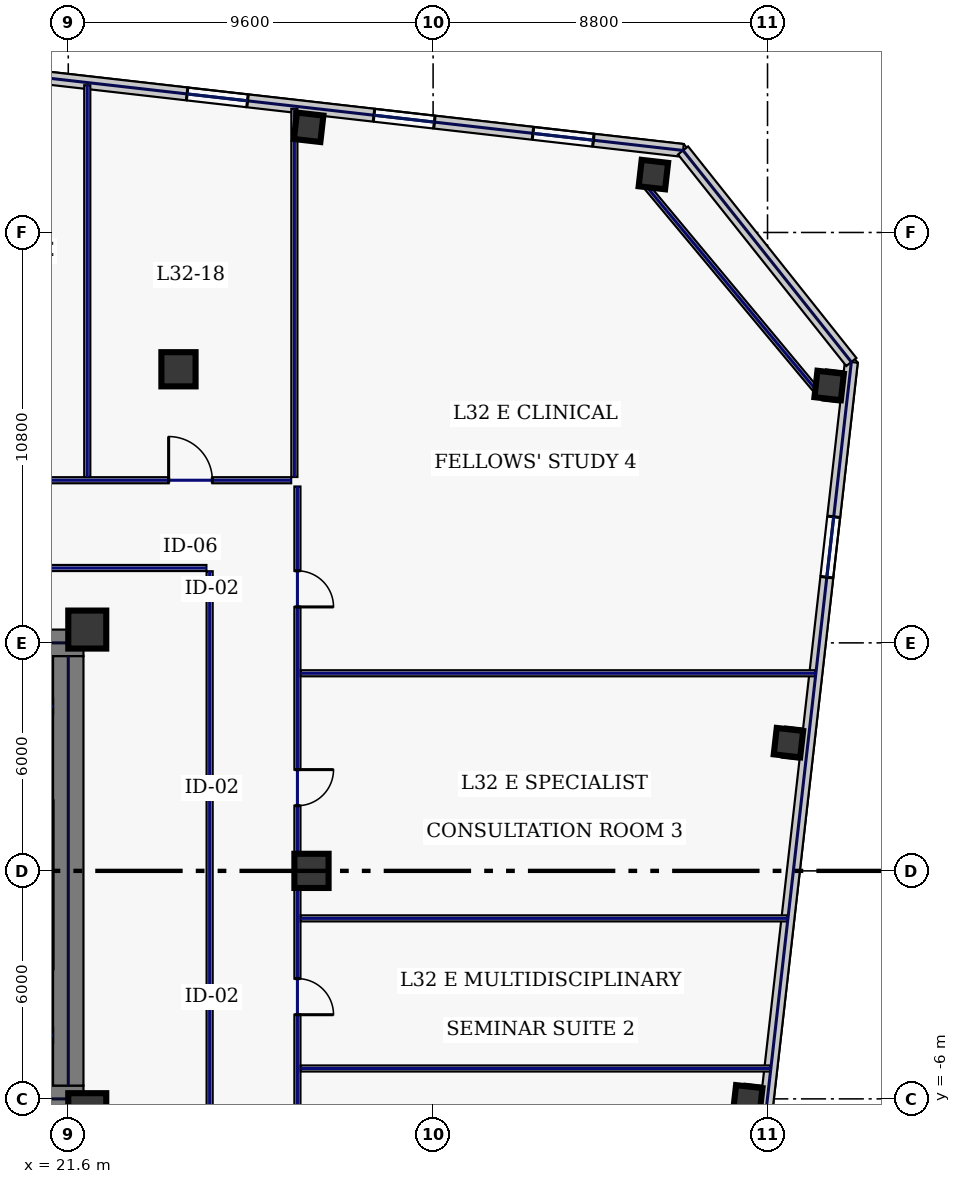
"""IFC4 building model, lengths in metres.
Left out: names, types, materials, properties, quantities, classifications, styles, units other than length and angle.
Written with IfcOpenShell. Run it as: python <this file> out.ifc"""

import sys

from ifc_helpers import new_model, si_unit, direction, frame, frame_2d, origin, origin_2d, place, context, subcontext, project, spatial, rectangle, hollow_rectangle, extrude, element, fill, save


model = new_model("IFC4")
c1 = context("Model", 3, precision=1e-05, world=origin(), true_north=direction((0.0, 1.0)))
c2 = subcontext(c1, "Body", "Model", "MODEL_VIEW")
j1 = project(units=[si_unit("LENGTHUNIT", "METRE"), si_unit("PLANEANGLEUNIT", "RADIAN")], contexts=[c1])
p1 = place(None, origin())
s1 = spatial("IfcSite", under=j1, at=p1, CompositionType="ELEMENT")
p2 = place(p1, origin())
s2 = spatial("IfcBuilding", under=s1, at=p2, CompositionType="ELEMENT")
p3 = place(p2, frame((0.0, 0.0, 141.4)))
s3 = spatial("IfcBuildingStorey", under=s2, at=p3, CompositionType="ELEMENT", Elevation=141.4)
for number, where, z_axis, x_axis in (
    (1, (10.45, 6.0, 0.0), (0.0, 0.0, 1.0), (1.0, 0.0, 0.0)),
    (2, (10.45, -6.0, 0.0), (0.0, 0.0, 1.0), (1.0, 0.0, 0.0)),
):
    element("IfcWall", number, at=place(p3, frame(where, z_axis=z_axis, x_axis=x_axis)), inside=s3, PredefinedType="SHEAR", context=c2, shape_type="SweptSolid", body=[
        extrude(rectangle(XDim=11.55, YDim=0.7, at=frame_2d((5.775, 0.0))), origin(), (0.0, 0.0, 1.0), 4.48),
    ])
p4 = place(p3, frame((21.6, -5.65, 0.0), z_axis=(0.0, 0.0, 1.0), x_axis=(0.0, 1.0, 0.0)))
e3 = element("IfcWall", 3, at=p4, inside=s3, PredefinedType="SHEAR", context=c2, shape_type="SweptSolid", body=[
    extrude(rectangle(XDim=11.3, YDim=0.8, at=frame_2d((5.65, 0.0))), origin(), (0.0, 0.0, 1.0), 4.48),
])
for number, where, z_axis, x_axis in (
    (4, (17.8, -4.325, 0.0), (0.0, 0.0, 1.0), (1.0, 0.0, 0.0)),
    (5, (17.8, 4.325, 0.0), (0.0, 0.0, 1.0), (1.0, 0.0, 0.0)),
):
    element("IfcWall", number, at=place(p3, frame(where, z_axis=z_axis, x_axis=x_axis)), inside=s3, PredefinedType="SHEAR", context=c2, shape_type="SweptSolid", body=[
        extrude(rectangle(XDim=3.4, YDim=0.4, at=frame_2d((1.7, 0.0))), origin(), (0.0, 0.0, 1.0), 4.48),
    ])
for number, where, z_axis, x_axis in (
    (6, (22.1, -6.35, 0.0), (0.0, 0.0, 1.0), (1.0, 0.0, 0.0)),
    (7, (22.1, 6.35, 0.0), (0.0, 0.0, 1.0), (1.0, 0.0, 0.0)),
):
    element("IfcColumn", number, at=place(p3, frame(where, z_axis=z_axis, x_axis=x_axis)), inside=s3, PredefinedType="COLUMN", context=c2, shape_type="SweptSolid", body=[
        extrude(hollow_rectangle(XDim=1.0, YDim=1.0, WallThickness=0.045, at=origin_2d()), origin(), (0.0, 0.0, 1.0), 4.48),
    ])
for number, where, z_axis, x_axis in (
    (8, (24.5, 13.2, 0.0), (0.0, 0.0, 1.0), (1.0, 0.0, 0.0)),
    (9, (28.0, 0.0, 0.0), (0.0, 0.0, 1.0), (1.0, 0.0, 0.0)),
):
    element("IfcColumn", number, at=place(p3, frame(where, z_axis=z_axis, x_axis=x_axis)), inside=s3, PredefinedType="COLUMN", context=c2, shape_type="SweptSolid", body=[
        extrude(hollow_rectangle(XDim=0.9, YDim=0.9, WallThickness=0.04, at=origin_2d()), origin(), (0.0, 0.0, 1.0), 4.48),
    ])
for number, where, z_axis, x_axis in (
    (10, (36.997, 18.323, 0.0), (0.0, 0.0, 1.0), (0.994, -0.113, 0.0)),
    (11, (27.926, 19.568, 0.0), (0.0, 0.0, 1.0), (0.994, -0.113, 0.0)),
    (12, (39.48, -6.025, 0.0), (0.0, 0.0, 1.0), (0.994, -0.113, 0.0)),
    (13, (40.551, 3.375, 0.0), (0.0, 0.0, 1.0), (0.994, -0.113, 0.0)),
    (14, (41.622, 12.774, 0.0), (0.0, 0.0, 1.0), (0.994, -0.113, 0.0)),
):
    element("IfcColumn", number, at=place(p3, frame(where, z_axis=z_axis, x_axis=x_axis)), inside=s3, PredefinedType="COLUMN", context=c2, shape_type="SweptSolid", body=[
        extrude(hollow_rectangle(XDim=0.7, YDim=0.7, WallThickness=0.032, at=origin_2d()), origin(), (0.0, 0.0, 1.0), 4.48),
    ])
p5 = place(p3, frame((37.777, 18.958, 0.0), z_axis=(0.0, 0.0, 1.0), x_axis=(-0.993570538923, 0.113214770165, 0.0)))
e15 = element("IfcWall", 15, at=p5, inside=s3, PredefinedType="STANDARD", context=c2, shape_type="SweptSolid", body=[
    extrude(rectangle(XDim=20.523, YDim=0.34, at=frame_2d((10.261, 0.0))), origin(), (0.0, 0.0, 1.0), 4.48),
])
p6 = place(p5, frame((11.535, 0.0, 0.22)))
e16 = element("IfcOpeningElement", 16, at=p6, cuts=e15, PredefinedType="OPENING", context=c2, shape_type="SweptSolid", body=[
    extrude(rectangle(XDim=1.6, YDim=1.2, at=frame_2d((0.8, 0.6))), frame((0.0, 0.18, 0.0), z_axis=(0.0, -1.0, 0.0), x_axis=(1.0, 0.0, 0.0)), (0.0, 0.0, 1.0), 0.36),
])
p7 = place(p5, frame((6.586, 0.0, 0.22)))
e17 = element("IfcOpeningElement", 17, at=p7, cuts=e15, PredefinedType="OPENING", context=c2, shape_type="SweptSolid", body=[
    extrude(rectangle(XDim=1.6, YDim=1.2, at=frame_2d((0.8, 0.6))), frame((0.0, 0.18, 0.0), z_axis=(0.0, -1.0, 0.0), x_axis=(1.0, 0.0, 0.0)), (0.0, 0.0, 1.0), 0.36),
])
p8 = place(p5, frame((2.375, 0.0, 0.22)))
e18 = element("IfcOpeningElement", 18, at=p8, cuts=e15, PredefinedType="OPENING", context=c2, shape_type="SweptSolid", body=[
    extrude(rectangle(XDim=1.6, YDim=1.2, at=frame_2d((0.8, 0.6))), frame((0.0, 0.18, 0.0), z_axis=(0.0, -1.0, 0.0), x_axis=(1.0, 0.0, 0.0)), (0.0, 0.0, 1.0), 0.36),
])
p9 = place(p3, frame((37.768, -25.556, 0.0), z_axis=(0.0, 0.0, 1.0), x_axis=(0.113201605824, 0.993572038877, 0.0)))
e19 = element("IfcWall", 19, at=p9, inside=s3, PredefinedType="STANDARD", context=c2, shape_type="SweptSolid", body=[
    extrude(rectangle(XDim=39.2, YDim=0.34, at=frame_2d((19.6, 0.0))), origin(), (0.0, 0.0, 1.0), 4.48),
])
p10 = place(p9, frame((4.1, 0.0, 0.22)))
e20 = element("IfcOpeningElement", 20, at=p10, cuts=e19, PredefinedType="OPENING", context=c2, shape_type="SweptSolid", body=[
    extrude(rectangle(XDim=1.6, YDim=1.2, at=frame_2d((0.8, 0.6))), frame((0.0, 0.18, 0.0), z_axis=(0.0, -1.0, 0.0), x_axis=(1.0, 0.0, 0.0)), (0.0, 0.0, 1.0), 0.36),
])
p11 = place(p9, frame((13.9, 0.0, 0.22)))
e21 = element("IfcOpeningElement", 21, at=p11, cuts=e19, PredefinedType="OPENING", context=c2, shape_type="SweptSolid", body=[
    extrude(rectangle(XDim=1.6, YDim=1.2, at=frame_2d((0.8, 0.6))), frame((0.0, 0.18, 0.0), z_axis=(0.0, -1.0, 0.0), x_axis=(1.0, 0.0, 0.0)), (0.0, 0.0, 1.0), 0.36),
])
p12 = place(p9, frame((33.5, 0.0, 0.22)))
e22 = element("IfcOpeningElement", 22, at=p12, cuts=e19, PredefinedType="OPENING", context=c2, shape_type="SweptSolid", body=[
    extrude(rectangle(XDim=1.6, YDim=1.2, at=frame_2d((0.8, 0.6))), frame((0.0, 0.18, 0.0), z_axis=(0.0, -1.0, 0.0), x_axis=(1.0, 0.0, 0.0)), (0.0, 0.0, 1.0), 0.36),
])
p13 = place(p3, frame((42.206, 13.392, 0.0), z_axis=(0.0, 0.0, 1.0), x_axis=(-0.622524521309, 0.782600294128, 0.0)))
e23 = element("IfcWall", 23, at=p13, inside=s3, PredefinedType="STANDARD", context=c2, shape_type="SweptSolid", body=[
    extrude(rectangle(XDim=7.113, YDim=0.34, at=frame_2d((3.557, 0.0))), origin(), (0.0, 0.0, 1.0), 2.875),
])
p14 = place(p3, frame((41.361, 12.556, 0.0), z_axis=(0.0, 0.0, 1.0), x_axis=(-0.640217638562, 0.768193579298, 0.0)))
e24 = element("IfcWall", 24, at=p14, inside=s3, PredefinedType="PARTITIONING", context=c2, shape_type="SweptSolid", body=[
    extrude(rectangle(XDim=7.224, YDim=0.16, at=frame_2d((3.612, 0.0))), origin(), (0.0, 0.0, 1.0), 2.275),
])
p15 = place(p3, frame((-27.465, 10.28, 0.0), z_axis=(0.0, 0.0, 1.0), x_axis=(1.0, 0.0, 0.0)))
e25 = element("IfcWall", 25, at=p15, inside=s3, PredefinedType="PARTITIONING", context=c2, shape_type="SweptSolid", body=[
    extrude(rectangle(XDim=54.93, YDim=0.16, at=frame_2d((27.465, 0.0))), origin(), (0.0, 0.0, 1.0), 4.48),
])
p16 = place(p15, frame((2.044, 0.0, 0.0)))
e26 = element("IfcOpeningElement", 26, at=p16, cuts=e25, PredefinedType="OPENING", context=c2, shape_type="SweptSolid", body=[
    extrude(rectangle(XDim=0.95, YDim=2.2, at=frame_2d((0.475, 1.1))), frame((0.0, 0.09, 0.0), z_axis=(0.0, -1.0, 0.0), x_axis=(1.0, 0.0, 0.0)), (0.0, 0.0, 1.0), 0.18),
])
p17 = place(p15, frame((6.75, 0.0, 0.0)))
e27 = element("IfcOpeningElement", 27, at=p17, cuts=e25, PredefinedType="OPENING", context=c2, shape_type="SweptSolid", body=[
    extrude(rectangle(XDim=1.3, YDim=2.2, at=frame_2d((0.65, 1.1))), frame((0.0, 0.09, 0.0), z_axis=(0.0, -1.0, 0.0), x_axis=(1.0, 0.0, 0.0)), (0.0, 0.0, 1.0), 0.18),
])
p18 = place(p15, frame((14.775, 0.0, 0.0)))
e28 = element("IfcOpeningElement", 28, at=p18, cuts=e25, PredefinedType="OPENING", context=c2, shape_type="SweptSolid", body=[
    extrude(rectangle(XDim=1.05, YDim=2.2, at=frame_2d((0.525, 1.1))), frame((0.0, 0.09, 0.0), z_axis=(0.0, -1.0, 0.0), x_axis=(1.0, 0.0, 0.0)), (0.0, 0.0, 1.0), 0.18),
])
p19 = place(p15, frame((25.275, 0.0, 0.0)))
e29 = element("IfcOpeningElement", 29, at=p19, cuts=e25, PredefinedType="OPENING", context=c2, shape_type="SweptSolid", body=[
    extrude(rectangle(XDim=0.95, YDim=2.2, at=frame_2d((0.475, 1.1))), frame((0.0, 0.09, 0.0), z_axis=(0.0, -1.0, 0.0), x_axis=(1.0, 0.0, 0.0)), (0.0, 0.0, 1.0), 0.18),
])
p20 = place(p15, frame((35.775, 0.0, 0.0)))
e30 = element("IfcOpeningElement", 30, at=p20, cuts=e25, PredefinedType="OPENING", context=c2, shape_type="SweptSolid", body=[
    extrude(rectangle(XDim=0.95, YDim=2.2, at=frame_2d((0.475, 1.1))), frame((0.0, 0.09, 0.0), z_axis=(0.0, -1.0, 0.0), x_axis=(1.0, 0.0, 0.0)), (0.0, 0.0, 1.0), 0.18),
])
p21 = place(p15, frame((44.85, 0.0, 0.0)))
e31 = element("IfcOpeningElement", 31, at=p21, cuts=e25, PredefinedType="OPENING", context=c2, shape_type="SweptSolid", body=[
    extrude(rectangle(XDim=1.45, YDim=2.2, at=frame_2d((0.725, 1.1))), frame((0.0, 0.09, 0.0), z_axis=(0.0, -1.0, 0.0), x_axis=(1.0, 0.0, 0.0)), (0.0, 0.0, 1.0), 0.18),
])
p22 = place(p15, frame((51.706, 0.0, 0.0)))
e32 = element("IfcOpeningElement", 32, at=p22, cuts=e25, PredefinedType="OPENING", context=c2, shape_type="SweptSolid", body=[
    extrude(rectangle(XDim=1.15, YDim=2.2, at=frame_2d((0.575, 1.1))), frame((0.0, 0.09, 0.0), z_axis=(0.0, -1.0, 0.0), x_axis=(1.0, 0.0, 0.0)), (0.0, 0.0, 1.0), 0.18),
])
p23 = place(p3, frame((27.63, 10.115, 0.0), z_axis=(0.0, 0.0, 1.0), x_axis=(0.0, -1.0, 0.0)))
e33 = element("IfcWall", 33, at=p23, inside=s3, PredefinedType="PARTITIONING", context=c2, shape_type="SweptSolid", body=[
    extrude(rectangle(XDim=20.13, YDim=0.16, at=frame_2d((10.065, 0.0))), origin(), (0.0, 0.0, 1.0), 4.48),
])
p24 = place(p23, frame((17.181, 0.0, 0.0)))
e34 = element("IfcOpeningElement", 34, at=p24, cuts=e33, PredefinedType="OPENING", context=c2, shape_type="SweptSolid", body=[
    extrude(rectangle(XDim=0.95, YDim=2.2, at=frame_2d((0.475, 1.1))), frame((0.0, 0.09, 0.0), z_axis=(0.0, -1.0, 0.0), x_axis=(1.0, 0.0, 0.0)), (0.0, 0.0, 1.0), 0.18),
])
p25 = place(p23, frame((12.95, 0.0, 0.0)))
e35 = element("IfcOpeningElement", 35, at=p25, cuts=e33, PredefinedType="OPENING", context=c2, shape_type="SweptSolid", body=[
    extrude(rectangle(XDim=0.95, YDim=2.2, at=frame_2d((0.475, 1.1))), frame((0.0, 0.09, 0.0), z_axis=(0.0, -1.0, 0.0), x_axis=(1.0, 0.0, 0.0)), (0.0, 0.0, 1.0), 0.18),
])
p26 = place(p23, frame((7.45, 0.0, 0.0)))
e36 = element("IfcOpeningElement", 36, at=p26, cuts=e33, PredefinedType="OPENING", context=c2, shape_type="SweptSolid", body=[
    extrude(rectangle(XDim=0.95, YDim=2.2, at=frame_2d((0.475, 1.1))), frame((0.0, 0.09, 0.0), z_axis=(0.0, -1.0, 0.0), x_axis=(1.0, 0.0, 0.0)), (0.0, 0.0, 1.0), 0.18),
])
p27 = place(p23, frame((2.219, 0.0, 0.0)))
e37 = element("IfcOpeningElement", 37, at=p27, cuts=e33, PredefinedType="OPENING", context=c2, shape_type="SweptSolid", body=[
    extrude(rectangle(XDim=0.95, YDim=2.2, at=frame_2d((0.475, 1.1))), frame((0.0, 0.09, 0.0), z_axis=(0.0, -1.0, 0.0), x_axis=(1.0, 0.0, 0.0)), (0.0, 0.0, 1.0), 0.18),
])
p28 = place(p3, frame((25.235, 7.97, 0.0), z_axis=(0.0, 0.0, 1.0), x_axis=(-1.0, 0.0, 0.0)))
e38 = element("IfcWall", 38, at=p28, inside=s3, PredefinedType="PARTITIONING", context=c2, shape_type="SweptSolid", body=[
    extrude(rectangle(XDim=14.57, YDim=0.16, at=frame_2d((7.285, 0.0))), origin(), (0.0, 0.0, 1.0), 4.48),
])
p29 = place(p3, frame((25.32, -7.785, 0.0), z_axis=(0.0, 0.0, 1.0), x_axis=(0.0, 1.0, 0.0)))
e39 = element("IfcWall", 39, at=p29, inside=s3, PredefinedType="PARTITIONING", context=c2, shape_type="SweptSolid", body=[
    extrude(rectangle(XDim=15.67, YDim=0.16, at=frame_2d((7.835, 0.0))), origin(), (0.0, 0.0, 1.0), 4.48),
])
p30 = place(p3, frame((27.55, 10.365, 0.0), z_axis=(0.0, 0.0, 1.0), x_axis=(0.0, 1.0, 0.0)))
e40 = element("IfcWall", 40, at=p30, inside=s3, PredefinedType="PARTITIONING", context=c2, shape_type="SweptSolid", body=[
    extrude(rectangle(XDim=9.688, YDim=0.16, at=frame_2d((4.844, 0.0))), origin(), (0.0, 0.0, 1.0), 4.48),
])
p31 = place(p3, frame((22.1, 10.365, 0.0), z_axis=(0.0, 0.0, 1.0), x_axis=(0.0, 1.0, 0.0)))
e41 = element("IfcWall", 41, at=p31, inside=s3, PredefinedType="PARTITIONING", context=c2, shape_type="SweptSolid", body=[
    extrude(rectangle(XDim=10.309, YDim=0.16, at=frame_2d((5.155, 0.0))), origin(), (0.0, 0.0, 1.0), 4.48),
])
p32 = place(p3, frame((27.715, -5.2, 0.0), z_axis=(0.0, 0.0, 1.0), x_axis=(1.0, 0.0, 0.0)))
e42 = element("IfcWall", 42, at=p32, inside=s3, PredefinedType="PARTITIONING", context=c2, shape_type="SweptSolid", body=[
    extrude(rectangle(XDim=12.352, YDim=0.16, at=frame_2d((6.176, 0.0))), origin(), (0.0, 0.0, 1.0), 4.48),
])
p33 = place(p3, frame((27.715, -1.25, 0.0), z_axis=(0.0, 0.0, 1.0), x_axis=(1.0, 0.0, 0.0)))
e43 = element("IfcWall", 43, at=p33, inside=s3, PredefinedType="PARTITIONING", context=c2, shape_type="SweptSolid", body=[
    extrude(rectangle(XDim=12.802, YDim=0.16, at=frame_2d((6.401, 0.0))), origin(), (0.0, 0.0, 1.0), 4.48),
])
p34 = place(p3, frame((27.715, 5.2, 0.0), z_axis=(0.0, 0.0, 1.0), x_axis=(1.0, 0.0, 0.0)))
e44 = element("IfcWall", 44, at=p34, inside=s3, PredefinedType="PARTITIONING", context=c2, shape_type="SweptSolid", body=[
    extrude(rectangle(XDim=13.537, YDim=0.16, at=frame_2d((6.769, 0.0))), origin(), (0.0, 0.0, 1.0), 4.48),
])
p35 = place(p6, origin())
e45 = element("IfcWindow", 45, at=p35, inside=s3, PartitioningType="SINGLE_PANEL", PredefinedType="WINDOW", context=c2, shape_type="SweptSolid", body=[
    extrude(rectangle(XDim=1.6, YDim=1.2, at=frame_2d((0.8, 0.6))), frame((0.0, 0.03, 0.0), z_axis=(0.0, -1.0, 0.0), x_axis=(1.0, 0.0, 0.0)), (0.0, 0.0, 1.0), 0.06),
])
fill(e16, e45)
p36 = place(p7, origin())
e46 = element("IfcWindow", 46, at=p36, inside=s3, PartitioningType="SINGLE_PANEL", PredefinedType="WINDOW", context=c2, shape_type="SweptSolid", body=[
    extrude(rectangle(XDim=1.6, YDim=1.2, at=frame_2d((0.8, 0.6))), frame((0.0, 0.03, 0.0), z_axis=(0.0, -1.0, 0.0), x_axis=(1.0, 0.0, 0.0)), (0.0, 0.0, 1.0), 0.06),
])
fill(e17, e46)
p37 = place(p8, origin())
e47 = element("IfcWindow", 47, at=p37, inside=s3, PartitioningType="SINGLE_PANEL", PredefinedType="WINDOW", context=c2, shape_type="SweptSolid", body=[
    extrude(rectangle(XDim=1.6, YDim=1.2, at=frame_2d((0.8, 0.6))), frame((0.0, 0.03, 0.0), z_axis=(0.0, -1.0, 0.0), x_axis=(1.0, 0.0, 0.0)), (0.0, 0.0, 1.0), 0.06),
])
fill(e18, e47)
p38 = place(p12, origin())
e48 = element("IfcWindow", 48, at=p38, inside=s3, PartitioningType="SINGLE_PANEL", PredefinedType="WINDOW", context=c2, shape_type="SweptSolid", body=[
    extrude(rectangle(XDim=1.6, YDim=1.2, at=frame_2d((0.8, 0.6))), frame((0.0, 0.03, 0.0), z_axis=(0.0, -1.0, 0.0), x_axis=(1.0, 0.0, 0.0)), (0.0, 0.0, 1.0), 0.06),
])
fill(e22, e48)
p39 = place(p22, origin())
e49 = element("IfcDoor", 49, at=p39, inside=s3, OperationType="SINGLE_SWING_LEFT", PredefinedType="DOOR", context=c2, shape_type="SweptSolid", body=[
    extrude(rectangle(XDim=1.15, YDim=2.2, at=frame_2d((0.575, 1.1))), frame((0.0, 0.025, 0.0), z_axis=(0.0, -1.0, 0.0), x_axis=(1.0, 0.0, 0.0)), (0.0, 0.0, 1.0), 0.05),
])
fill(e32, e49)
p40 = place(p25, origin())
e50 = element("IfcDoor", 50, at=p40, inside=s3, OperationType="SINGLE_SWING_RIGHT", PredefinedType="DOOR", context=c2, shape_type="SweptSolid", body=[
    extrude(rectangle(XDim=0.95, YDim=2.2, at=frame_2d((0.475, 1.1))), frame((0.0, 0.025, 0.0), z_axis=(0.0, -1.0, 0.0), x_axis=(1.0, 0.0, 0.0)), (0.0, 0.0, 1.0), 0.05),
])
fill(e35, e50)
p41 = place(p26, origin())
e51 = element("IfcDoor", 51, at=p41, inside=s3, OperationType="SINGLE_SWING_LEFT", PredefinedType="DOOR", context=c2, shape_type="SweptSolid", body=[
    extrude(rectangle(XDim=0.95, YDim=2.2, at=frame_2d((0.475, 1.1))), frame((0.0, 0.025, 0.0), z_axis=(0.0, -1.0, 0.0), x_axis=(1.0, 0.0, 0.0)), (0.0, 0.0, 1.0), 0.05),
])
fill(e36, e51)
p42 = place(p27, origin())
e52 = element("IfcDoor", 52, at=p42, inside=s3, OperationType="SINGLE_SWING_RIGHT", PredefinedType="DOOR", context=c2, shape_type="SweptSolid", body=[
    extrude(rectangle(XDim=0.95, YDim=2.2, at=frame_2d((0.475, 1.1))), frame((0.0, 0.025, 0.0), z_axis=(0.0, -1.0, 0.0), x_axis=(1.0, 0.0, 0.0)), (0.0, 0.0, 1.0), 0.05),
])
fill(e37, e52)
save(model, sys.argv[1])
